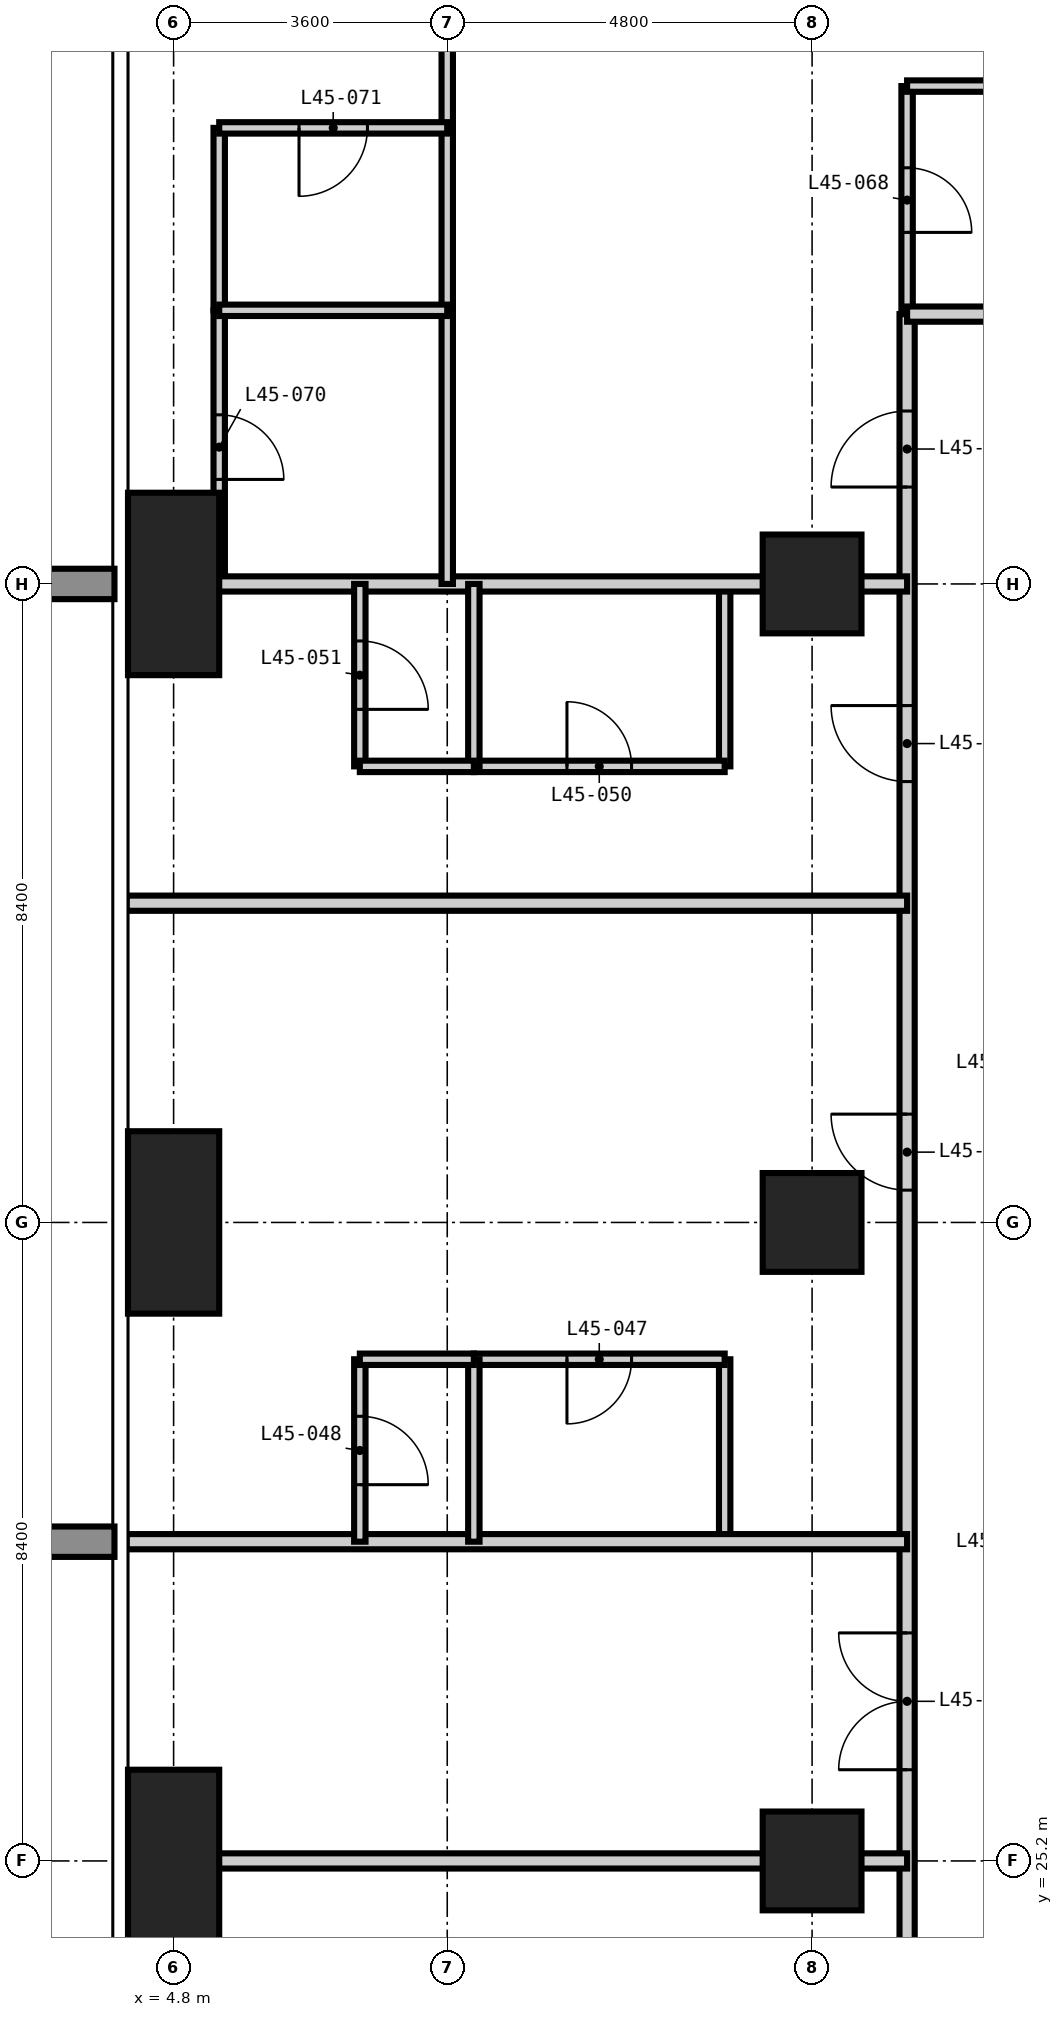
"""IFC4 building model, lengths in metres.
Left out: names, types, materials, properties, quantities, classifications, styles, units other than length and angle.
Written with IfcOpenShell. Run it as: python <this file> out.ifc"""

import sys

from ifc_helpers import new_model, si_unit, direction, frame, frame_2d, origin, origin_2d, place, context, subcontext, project, spatial, rectangle, extrude, element, fill, save


model = new_model("IFC4")
c1 = context("Model", 3, precision=1e-05, world=origin(), true_north=direction((0.0, 1.0)))
c2 = subcontext(c1, "Body", "Model", "MODEL_VIEW")
j1 = project(units=[si_unit("LENGTHUNIT", "METRE"), si_unit("PLANEANGLEUNIT", "RADIAN")], contexts=[c1])
p1 = place(None, origin())
s1 = spatial("IfcSite", under=j1, at=p1, CompositionType="ELEMENT")
p2 = place(p1, origin())
s2 = spatial("IfcBuilding", under=s1, at=p2, CompositionType="ELEMENT")
p3 = place(p2, frame((0.0, 0.0, 177.0)))
s3 = spatial("IfcBuildingStorey", under=s2, at=p3, CompositionType="ELEMENT", Elevation=177.0)
for number, where, z_axis, x_axis in (
    (1, (4.8, 25.2, -0.35), (0.0, 0.0, 1.0), (1.0, 0.0, 0.0)),
    (2, (4.8, 33.6, -0.35), (0.0, 0.0, 1.0), (1.0, 0.0, 0.0)),
    (3, (4.8, 42.0, -0.35), (0.0, 0.0, 1.0), (1.0, 0.0, 0.0)),
):
    element("IfcColumn", number, at=place(p3, frame(where, z_axis=z_axis, x_axis=x_axis)), inside=s3, PredefinedType="COLUMN", context=c2, shape_type="SweptSolid", body=[
        extrude(rectangle(XDim=1.2, YDim=2.4, at=origin_2d()), origin(), (0.0, 0.0, 1.0), 3.6),
    ])
for number, where, z_axis, x_axis in (
    (4, (13.2, 25.2, -0.35), (0.0, 0.0, 1.0), (1.0, 0.0, 0.0)),
    (5, (13.2, 33.6, -0.35), (0.0, 0.0, 1.0), (1.0, 0.0, 0.0)),
    (6, (13.2, 42.0, -0.35), (0.0, 0.0, 1.0), (1.0, 0.0, 0.0)),
):
    element("IfcColumn", number, at=place(p3, frame(where, z_axis=z_axis, x_axis=x_axis)), inside=s3, PredefinedType="COLUMN", context=c2, shape_type="SweptSolid", body=[
        extrude(rectangle(XDim=1.3, YDim=1.3, at=origin_2d()), origin(), (0.0, 0.0, 1.0), 3.6),
    ])
p4 = place(p3, frame((5.4, 42.0, 0.0), z_axis=(0.0, 0.0, 1.0), x_axis=(0.0, 1.0, 0.0)))
e7 = element("IfcWall", 7, at=p4, inside=s3, PredefinedType="PARTITIONING", context=c2, shape_type="SweptSolid", body=[
    extrude(rectangle(XDim=3.6, YDim=0.15, at=frame_2d((1.8, 0.0))), origin(), (0.0, 0.0, 1.0), 3.25),
])
p5 = place(p4, frame((1.375, 0.0, 0.0)))
e8 = element("IfcOpeningElement", 8, at=p5, cuts=e7, PredefinedType="OPENING", context=c2, shape_type="SweptSolid", body=[
    extrude(rectangle(XDim=0.85, YDim=2.1, at=frame_2d((0.425, 1.05))), frame((0.0, 0.085, 0.0), z_axis=(0.0, -1.0, 0.0), x_axis=(1.0, 0.0, 0.0)), (0.0, 0.0, 1.0), 0.17),
])
p6 = place(p3, frame((12.05, 29.4, 0.0), z_axis=(0.0, 0.0, 1.0), x_axis=(0.0, 1.0, 0.0)))
e9 = element("IfcWall", 9, at=p6, inside=s3, PredefinedType="PARTITIONING", context=c2, shape_type="SweptSolid", body=[
    extrude(rectangle(XDim=2.4, YDim=0.15, at=frame_2d((1.2, 0.0))), origin(), (0.0, 0.0, 1.0), 3.25),
])
p7 = place(p3, frame((12.05, 39.6, 0.0), z_axis=(0.0, 0.0, 1.0), x_axis=(0.0, 1.0, 0.0)))
e10 = element("IfcWall", 10, at=p7, inside=s3, PredefinedType="PARTITIONING", context=c2, shape_type="SweptSolid", body=[
    extrude(rectangle(XDim=2.4, YDim=0.15, at=frame_2d((1.2, 0.0))), origin(), (0.0, 0.0, 1.0), 3.25),
])
p8 = place(p3, frame((14.45, 45.55, 0.0), z_axis=(0.0, 0.0, 1.0), x_axis=(0.0, 1.0, 0.0)))
e11 = element("IfcWall", 11, at=p8, inside=s3, PredefinedType="PARTITIONING", context=c2, shape_type="SweptSolid", body=[
    extrude(rectangle(XDim=3.0, YDim=0.15, at=frame_2d((1.5, 0.0))), origin(), (0.0, 0.0, 1.0), 3.25),
])
p9 = place(p8, frame((1.075, 0.0, 0.0)))
e12 = element("IfcOpeningElement", 12, at=p9, cuts=e11, PredefinedType="OPENING", context=c2, shape_type="SweptSolid", body=[
    extrude(rectangle(XDim=0.85, YDim=2.1, at=frame_2d((0.425, 1.05))), frame((0.0, 0.085, 0.0), z_axis=(0.0, -1.0, 0.0), x_axis=(1.0, 0.0, 0.0)), (0.0, 0.0, 1.0), 0.17),
])
p10 = place(p3, frame((8.75, 31.8, 0.0), z_axis=(0.0, 0.0, 1.0), x_axis=(1.0, 0.0, 0.0)))
e13 = element("IfcWall", 13, at=p10, inside=s3, PredefinedType="PARTITIONING", context=c2, shape_type="SweptSolid", body=[
    extrude(rectangle(XDim=3.3, YDim=0.15, at=frame_2d((1.65, 0.0))), origin(), (0.0, 0.0, 1.0), 3.25),
])
p11 = place(p10, frame((1.225, 0.0, 0.0)))
e14 = element("IfcOpeningElement", 14, at=p11, cuts=e13, PredefinedType="OPENING", context=c2, shape_type="SweptSolid", body=[
    extrude(rectangle(XDim=0.85, YDim=2.1, at=frame_2d((0.425, 1.05))), frame((0.0, 0.085, 0.0), z_axis=(0.0, -1.0, 0.0), x_axis=(1.0, 0.0, 0.0)), (0.0, 0.0, 1.0), 0.17),
])
p12 = place(p3, frame((8.75, 39.6, 0.0), z_axis=(0.0, 0.0, 1.0), x_axis=(1.0, 0.0, 0.0)))
e15 = element("IfcWall", 15, at=p12, inside=s3, PredefinedType="PARTITIONING", context=c2, shape_type="SweptSolid", body=[
    extrude(rectangle(XDim=3.3, YDim=0.15, at=frame_2d((1.65, 0.0))), origin(), (0.0, 0.0, 1.0), 3.25),
])
p13 = place(p12, frame((1.225, 0.0, 0.0)))
e16 = element("IfcOpeningElement", 16, at=p13, cuts=e15, PredefinedType="OPENING", context=c2, shape_type="SweptSolid", body=[
    extrude(rectangle(XDim=0.85, YDim=2.1, at=frame_2d((0.425, 1.05))), frame((0.0, 0.085, 0.0), z_axis=(0.0, -1.0, 0.0), x_axis=(1.0, 0.0, 0.0)), (0.0, 0.0, 1.0), 0.17),
])
p14 = place(p3, frame((14.45, 48.55, 0.0), z_axis=(0.0, 0.0, 1.0), x_axis=(1.0, 0.0, 0.0)))
e17 = element("IfcWall", 17, at=p14, inside=s3, PredefinedType="PARTITIONING", context=c2, shape_type="SweptSolid", body=[
    extrude(rectangle(XDim=2.35, YDim=0.15, at=frame_2d((1.175, 0.0))), origin(), (0.0, 0.0, 1.0), 3.25),
])
p15 = place(p3, frame((14.45, 14.45, 0.0), z_axis=(0.0, 0.0, 1.0), x_axis=(0.0, 1.0, 0.0)))
e18 = element("IfcWall", 18, at=p15, inside=s3, PredefinedType="PARTITIONING", context=c2, shape_type="SweptSolid", body=[
    extrude(rectangle(XDim=31.1, YDim=0.2, at=frame_2d((15.55, 0.0))), origin(), (0.0, 0.0, 1.0), 3.25),
])
p16 = place(p15, frame((6.05, 0.0, 0.0)))
e19 = element("IfcOpeningElement", 19, at=p16, cuts=e18, PredefinedType="OPENING", context=c2, shape_type="SweptSolid", body=[
    extrude(rectangle(XDim=1.0, YDim=2.2, at=frame_2d((0.5, 1.1))), frame((0.0, 0.11, 0.0), z_axis=(0.0, -1.0, 0.0), x_axis=(1.0, 0.0, 0.0)), (0.0, 0.0, 1.0), 0.22),
])
p17 = place(p15, frame((11.95, 0.0, 0.0)))
e20 = element("IfcOpeningElement", 20, at=p17, cuts=e18, PredefinedType="OPENING", context=c2, shape_type="SweptSolid", body=[
    extrude(rectangle(XDim=1.8, YDim=2.4, at=frame_2d((0.9, 1.2))), frame((0.0, 0.11, 0.0), z_axis=(0.0, -1.0, 0.0), x_axis=(1.0, 0.0, 0.0)), (0.0, 0.0, 1.0), 0.22),
])
p18 = place(p15, frame((19.575, 0.0, 0.0)))
e21 = element("IfcOpeningElement", 21, at=p18, cuts=e18, PredefinedType="OPENING", context=c2, shape_type="SweptSolid", body=[
    extrude(rectangle(XDim=1.0, YDim=2.2, at=frame_2d((0.5, 1.1))), frame((0.0, 0.11, 0.0), z_axis=(0.0, -1.0, 0.0), x_axis=(1.0, 0.0, 0.0)), (0.0, 0.0, 1.0), 0.22),
])
p19 = place(p15, frame((24.95, 0.0, 0.0)))
e22 = element("IfcOpeningElement", 22, at=p19, cuts=e18, PredefinedType="OPENING", context=c2, shape_type="SweptSolid", body=[
    extrude(rectangle(XDim=1.0, YDim=2.2, at=frame_2d((0.5, 1.1))), frame((0.0, 0.11, 0.0), z_axis=(0.0, -1.0, 0.0), x_axis=(1.0, 0.0, 0.0)), (0.0, 0.0, 1.0), 0.22),
])
p20 = place(p15, frame((0.675, 0.0, 0.0)))
e23 = element("IfcOpeningElement", 23, at=p20, cuts=e18, PredefinedType="OPENING", context=c2, shape_type="SweptSolid", body=[
    extrude(rectangle(XDim=1.0, YDim=2.2, at=frame_2d((0.5, 1.1))), frame((0.0, 0.11, 0.0), z_axis=(0.0, -1.0, 0.0), x_axis=(1.0, 0.0, 0.0)), (0.0, 0.0, 1.0), 0.22),
])
p21 = place(p15, frame((28.825, 0.0, 0.0)))
e24 = element("IfcOpeningElement", 24, at=p21, cuts=e18, PredefinedType="OPENING", context=c2, shape_type="SweptSolid", body=[
    extrude(rectangle(XDim=1.0, YDim=2.2, at=frame_2d((0.5, 1.1))), frame((0.0, 0.11, 0.0), z_axis=(0.0, -1.0, 0.0), x_axis=(1.0, 0.0, 0.0)), (0.0, 0.0, 1.0), 0.22),
])
p22 = place(p3, frame((14.45, 45.55, 0.0), z_axis=(0.0, 0.0, 1.0), x_axis=(1.0, 0.0, 0.0)))
e25 = element("IfcWall", 25, at=p22, inside=s3, PredefinedType="PARTITIONING", context=c2, shape_type="SweptSolid", body=[
    extrude(rectangle(XDim=2.35, YDim=0.2, at=frame_2d((1.175, 0.0))), origin(), (0.0, 0.0, 1.0), 3.25),
])
for number, where, z_axis, x_axis in (
    (26, (4.182, 25.2, 0.0), (0.0, 0.0, 1.0), (1.0, 0.0, 0.0)),
    (27, (4.182, 29.4, 0.0), (0.0, 0.0, 1.0), (1.0, 0.0, 0.0)),
    (28, (4.182, 37.8, 0.0), (0.0, 0.0, 1.0), (1.0, 0.0, 0.0)),
    (29, (4.182, 42.0, 0.0), (0.0, 0.0, 1.0), (1.0, 0.0, 0.0)),
):
    element("IfcWall", number, at=place(p3, frame(where, z_axis=z_axis, x_axis=x_axis)), inside=s3, PredefinedType="PARTITIONING", context=c2, shape_type="SweptSolid", body=[
        extrude(rectangle(XDim=10.268, YDim=0.2, at=frame_2d((5.134, 0.0))), origin(), (0.0, 0.0, 1.0), 3.25),
    ])
p23 = place(p3, frame((5.4, 45.6, 0.0), z_axis=(0.0, 0.0, 1.0), x_axis=(0.0, 1.0, 0.0)))
e30 = element("IfcWall", 30, at=p23, inside=s3, PredefinedType="PARTITIONING", context=c2, shape_type="SweptSolid", body=[
    extrude(rectangle(XDim=2.4, YDim=0.15, at=frame_2d((1.2, 0.0))), origin(), (0.0, 0.0, 1.0), 3.25),
])
p24 = place(p3, frame((7.25, 29.4, 0.0), z_axis=(0.0, 0.0, 1.0), x_axis=(0.0, 1.0, 0.0)))
e31 = element("IfcWall", 31, at=p24, inside=s3, PredefinedType="PARTITIONING", context=c2, shape_type="SweptSolid", body=[
    extrude(rectangle(XDim=2.4, YDim=0.15, at=frame_2d((1.2, 0.0))), origin(), (0.0, 0.0, 1.0), 3.25),
])
p25 = place(p24, frame((0.75, 0.0, 0.0)))
e32 = element("IfcOpeningElement", 32, at=p25, cuts=e31, PredefinedType="OPENING", context=c2, shape_type="SweptSolid", body=[
    extrude(rectangle(XDim=0.9, YDim=2.1, at=frame_2d((0.45, 1.05))), frame((0.0, 0.085, 0.0), z_axis=(0.0, -1.0, 0.0), x_axis=(1.0, 0.0, 0.0)), (0.0, 0.0, 1.0), 0.17),
])
p26 = place(p3, frame((7.25, 39.6, 0.0), z_axis=(0.0, 0.0, 1.0), x_axis=(0.0, 1.0, 0.0)))
e33 = element("IfcWall", 33, at=p26, inside=s3, PredefinedType="PARTITIONING", context=c2, shape_type="SweptSolid", body=[
    extrude(rectangle(XDim=2.4, YDim=0.15, at=frame_2d((1.2, 0.0))), origin(), (0.0, 0.0, 1.0), 3.25),
])
p27 = place(p26, frame((0.75, 0.0, 0.0)))
e34 = element("IfcOpeningElement", 34, at=p27, cuts=e33, PredefinedType="OPENING", context=c2, shape_type="SweptSolid", body=[
    extrude(rectangle(XDim=0.9, YDim=2.1, at=frame_2d((0.45, 1.05))), frame((0.0, 0.085, 0.0), z_axis=(0.0, -1.0, 0.0), x_axis=(1.0, 0.0, 0.0)), (0.0, 0.0, 1.0), 0.17),
])
p28 = place(p3, frame((8.4, 42.0, 0.0), z_axis=(0.0, 0.0, 1.0), x_axis=(0.0, 1.0, 0.0)))
e35 = element("IfcWall", 35, at=p28, inside=s3, PredefinedType="PARTITIONING", context=c2, shape_type="SweptSolid", body=[
    extrude(rectangle(XDim=12.618, YDim=0.15, at=frame_2d((6.309, 0.0))), origin(), (0.0, 0.0, 1.0), 3.25),
])
p29 = place(p28, frame((8.85, 0.0, 0.0)))
e36 = element("IfcOpeningElement", 36, at=p29, cuts=e35, PredefinedType="OPENING", context=c2, shape_type="SweptSolid", body=[
    extrude(rectangle(XDim=0.9, YDim=2.1, at=frame_2d((0.45, 1.05))), frame((0.0, 0.085, 0.0), z_axis=(0.0, -1.0, 0.0), x_axis=(1.0, 0.0, 0.0)), (0.0, 0.0, 1.0), 0.17),
])
p30 = place(p3, frame((8.75, 29.4, 0.0), z_axis=(0.0, 0.0, 1.0), x_axis=(0.0, 1.0, 0.0)))
e37 = element("IfcWall", 37, at=p30, inside=s3, PredefinedType="PARTITIONING", context=c2, shape_type="SweptSolid", body=[
    extrude(rectangle(XDim=2.4, YDim=0.15, at=frame_2d((1.2, 0.0))), origin(), (0.0, 0.0, 1.0), 3.25),
])
p31 = place(p3, frame((8.75, 39.6, 0.0), z_axis=(0.0, 0.0, 1.0), x_axis=(0.0, 1.0, 0.0)))
e38 = element("IfcWall", 38, at=p31, inside=s3, PredefinedType="PARTITIONING", context=c2, shape_type="SweptSolid", body=[
    extrude(rectangle(XDim=2.4, YDim=0.15, at=frame_2d((1.2, 0.0))), origin(), (0.0, 0.0, 1.0), 3.25),
])
for number, where, z_axis, x_axis in (
    (39, (7.25, 31.8, 0.0), (0.0, 0.0, 1.0), (1.0, 0.0, 0.0)),
    (40, (7.25, 39.6, 0.0), (0.0, 0.0, 1.0), (1.0, 0.0, 0.0)),
):
    element("IfcWall", number, at=place(p3, frame(where, z_axis=z_axis, x_axis=x_axis)), inside=s3, PredefinedType="PARTITIONING", context=c2, shape_type="SweptSolid", body=[
        extrude(rectangle(XDim=1.5, YDim=0.15, at=frame_2d((0.75, 0.0))), origin(), (0.0, 0.0, 1.0), 3.25),
    ])
p32 = place(p3, frame((5.4, 45.6, 0.0), z_axis=(0.0, 0.0, 1.0), x_axis=(1.0, 0.0, 0.0)))
e41 = element("IfcWall", 41, at=p32, inside=s3, PredefinedType="PARTITIONING", context=c2, shape_type="SweptSolid", body=[
    extrude(rectangle(XDim=3.0, YDim=0.15, at=frame_2d((1.5, 0.0))), origin(), (0.0, 0.0, 1.0), 3.25),
])
p33 = place(p3, frame((5.4, 48.0, 0.0), z_axis=(0.0, 0.0, 1.0), x_axis=(1.0, 0.0, 0.0)))
e42 = element("IfcWall", 42, at=p33, inside=s3, PredefinedType="PARTITIONING", context=c2, shape_type="SweptSolid", body=[
    extrude(rectangle(XDim=3.0, YDim=0.15, at=frame_2d((1.5, 0.0))), origin(), (0.0, 0.0, 1.0), 3.25),
])
p34 = place(p33, frame((1.05, 0.0, 0.0)))
e43 = element("IfcOpeningElement", 43, at=p34, cuts=e42, PredefinedType="OPENING", context=c2, shape_type="SweptSolid", body=[
    extrude(rectangle(XDim=0.9, YDim=2.1, at=frame_2d((0.45, 1.05))), frame((0.0, 0.085, 0.0), z_axis=(0.0, -1.0, 0.0), x_axis=(1.0, 0.0, 0.0)), (0.0, 0.0, 1.0), 0.17),
])
p35 = place(p17, origin())
e44 = element("IfcDoor", 44, at=p35, inside=s3, OperationType="DOUBLE_DOOR_DOUBLE_SWING", PredefinedType="DOOR", context=c2, shape_type="SweptSolid", body=[
    extrude(rectangle(XDim=1.8, YDim=2.4, at=frame_2d((0.9, 1.2))), frame((0.0, 0.025, 0.0), z_axis=(0.0, -1.0, 0.0), x_axis=(1.0, 0.0, 0.0)), (0.0, 0.0, 1.0), 0.05),
])
fill(e20, e44)
p36 = place(p18, origin())
e45 = element("IfcDoor", 45, at=p36, inside=s3, OperationType="SINGLE_SWING_RIGHT", PredefinedType="DOOR", context=c2, shape_type="SweptSolid", body=[
    extrude(rectangle(XDim=1.0, YDim=2.2, at=frame_2d((0.5, 1.1))), frame((0.0, 0.025, 0.0), z_axis=(0.0, -1.0, 0.0), x_axis=(1.0, 0.0, 0.0)), (0.0, 0.0, 1.0), 0.05),
])
fill(e21, e45)
p37 = place(p11, frame((0.85, 0.0, 0.0), z_axis=(0.0, 0.0, 1.0), x_axis=(-1.0, 0.0, 0.0)))
e46 = element("IfcDoor", 46, at=p37, inside=s3, OperationType="SINGLE_SWING_RIGHT", PredefinedType="DOOR", context=c2, shape_type="SweptSolid", body=[
    extrude(rectangle(XDim=0.85, YDim=2.1, at=frame_2d((0.425, 1.05))), frame((0.0, 0.025, 0.0), z_axis=(0.0, -1.0, 0.0), x_axis=(1.0, 0.0, 0.0)), (0.0, 0.0, 1.0), 0.05),
])
fill(e14, e46)
p38 = place(p25, frame((0.9, 0.0, 0.0), z_axis=(0.0, 0.0, 1.0), x_axis=(-1.0, 0.0, 0.0)))
e47 = element("IfcDoor", 47, at=p38, inside=s3, OperationType="SINGLE_SWING_RIGHT", PredefinedType="DOOR", context=c2, shape_type="SweptSolid", body=[
    extrude(rectangle(XDim=0.9, YDim=2.1, at=frame_2d((0.45, 1.05))), frame((0.0, 0.025, 0.0), z_axis=(0.0, -1.0, 0.0), x_axis=(1.0, 0.0, 0.0)), (0.0, 0.0, 1.0), 0.05),
])
fill(e32, e47)
p39 = place(p19, origin())
e48 = element("IfcDoor", 48, at=p39, inside=s3, OperationType="SINGLE_SWING_RIGHT", PredefinedType="DOOR", context=c2, shape_type="SweptSolid", body=[
    extrude(rectangle(XDim=1.0, YDim=2.2, at=frame_2d((0.5, 1.1))), frame((0.0, 0.025, 0.0), z_axis=(0.0, -1.0, 0.0), x_axis=(1.0, 0.0, 0.0)), (0.0, 0.0, 1.0), 0.05),
])
fill(e22, e48)
p40 = place(p13, origin())
e49 = element("IfcDoor", 49, at=p40, inside=s3, OperationType="SINGLE_SWING_LEFT", PredefinedType="DOOR", context=c2, shape_type="SweptSolid", body=[
    extrude(rectangle(XDim=0.85, YDim=2.1, at=frame_2d((0.425, 1.05))), frame((0.0, 0.025, 0.0), z_axis=(0.0, -1.0, 0.0), x_axis=(1.0, 0.0, 0.0)), (0.0, 0.0, 1.0), 0.05),
])
fill(e16, e49)
p41 = place(p27, frame((0.9, 0.0, 0.0), z_axis=(0.0, 0.0, 1.0), x_axis=(-1.0, 0.0, 0.0)))
e50 = element("IfcDoor", 50, at=p41, inside=s3, OperationType="SINGLE_SWING_RIGHT", PredefinedType="DOOR", context=c2, shape_type="SweptSolid", body=[
    extrude(rectangle(XDim=0.9, YDim=2.1, at=frame_2d((0.45, 1.05))), frame((0.0, 0.025, 0.0), z_axis=(0.0, -1.0, 0.0), x_axis=(1.0, 0.0, 0.0)), (0.0, 0.0, 1.0), 0.05),
])
fill(e34, e50)
p42 = place(p21, origin())
e51 = element("IfcDoor", 51, at=p42, inside=s3, OperationType="SINGLE_SWING_LEFT", PredefinedType="DOOR", context=c2, shape_type="SweptSolid", body=[
    extrude(rectangle(XDim=1.0, YDim=2.2, at=frame_2d((0.5, 1.1))), frame((0.0, 0.025, 0.0), z_axis=(0.0, -1.0, 0.0), x_axis=(1.0, 0.0, 0.0)), (0.0, 0.0, 1.0), 0.05),
])
fill(e24, e51)
p43 = place(p9, frame((0.85, 0.0, 0.0), z_axis=(0.0, 0.0, 1.0), x_axis=(-1.0, 0.0, 0.0)))
e52 = element("IfcDoor", 52, at=p43, inside=s3, OperationType="SINGLE_SWING_RIGHT", PredefinedType="DOOR", context=c2, shape_type="SweptSolid", body=[
    extrude(rectangle(XDim=0.85, YDim=2.1, at=frame_2d((0.425, 1.05))), frame((0.0, 0.025, 0.0), z_axis=(0.0, -1.0, 0.0), x_axis=(1.0, 0.0, 0.0)), (0.0, 0.0, 1.0), 0.05),
])
fill(e12, e52)
p44 = place(p5, frame((0.85, 0.0, 0.0), z_axis=(0.0, 0.0, 1.0), x_axis=(-1.0, 0.0, 0.0)))
e53 = element("IfcDoor", 53, at=p44, inside=s3, OperationType="SINGLE_SWING_RIGHT", PredefinedType="DOOR", context=c2, shape_type="SweptSolid", body=[
    extrude(rectangle(XDim=0.85, YDim=2.1, at=frame_2d((0.425, 1.05))), frame((0.0, 0.025, 0.0), z_axis=(0.0, -1.0, 0.0), x_axis=(1.0, 0.0, 0.0)), (0.0, 0.0, 1.0), 0.05),
])
fill(e8, e53)
p45 = place(p34, frame((0.9, 0.0, 0.0), z_axis=(0.0, 0.0, 1.0), x_axis=(-1.0, 0.0, 0.0)))
e54 = element("IfcDoor", 54, at=p45, inside=s3, OperationType="SINGLE_SWING_RIGHT", PredefinedType="DOOR", context=c2, shape_type="SweptSolid", body=[
    extrude(rectangle(XDim=0.9, YDim=2.1, at=frame_2d((0.45, 1.05))), frame((0.0, 0.025, 0.0), z_axis=(0.0, -1.0, 0.0), x_axis=(1.0, 0.0, 0.0)), (0.0, 0.0, 1.0), 0.05),
])
fill(e43, e54)
save(model, sys.argv[1])
